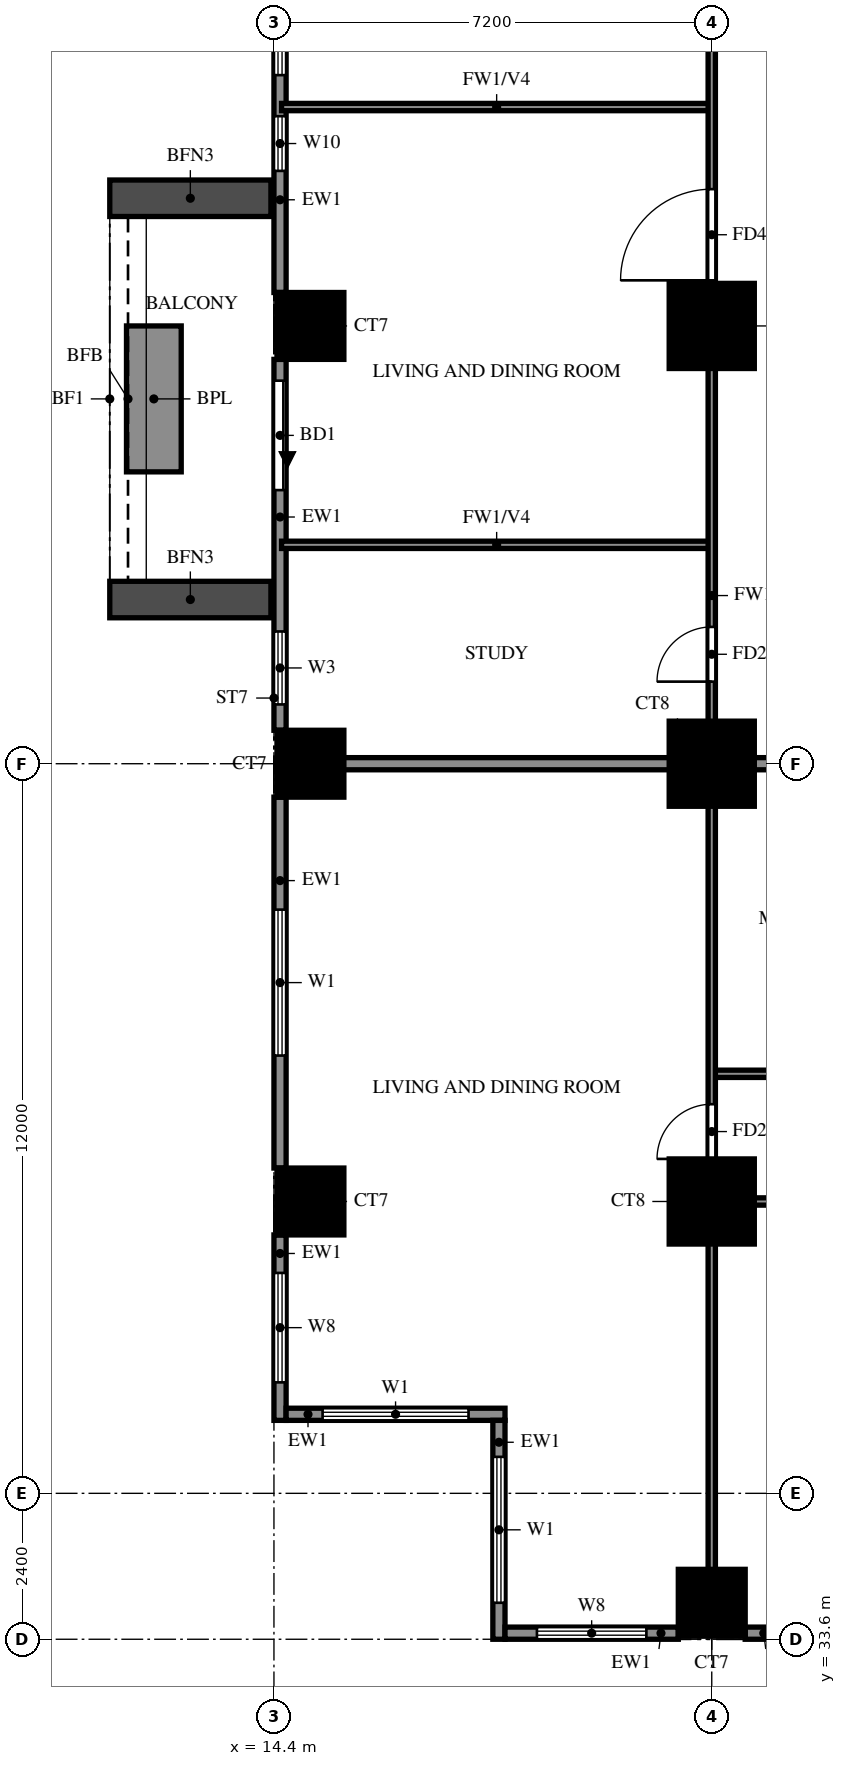
"""IFC4 building model, lengths in metres.
Left out: names, types, materials, properties, quantities, classifications, styles, units other than length and angle.
Written with IfcOpenShell. Run it as: python <this file> out.ifc"""

import sys

from ifc_helpers import new_model, si_unit, direction, frame, frame_2d, origin, origin_2d, place, context, subcontext, project, spatial, rectangle, extrude, source, transform, mapped, element, fill, save


model = new_model("IFC4")
c1 = context("Model", 3, precision=1e-05, world=origin(), true_north=direction((0.0, 1.0)))
c2 = subcontext(c1, "Body", "Model", "MODEL_VIEW")
j1 = project(units=[si_unit("LENGTHUNIT", "METRE"), si_unit("PLANEANGLEUNIT", "RADIAN")], contexts=[c1])
p1 = place(None, origin())
s1 = spatial("IfcSite", under=j1, at=p1, CompositionType="ELEMENT")
p2 = place(p1, origin())
s2 = spatial("IfcBuilding", under=s1, at=p2, CompositionType="ELEMENT")
p3 = place(p2, frame((0.0, 0.0, 34.0)))
s3 = spatial("IfcBuildingStorey", under=s2, at=p3, CompositionType="ELEMENT", Elevation=34.0)
m1 = source(origin(), c2, "Body", "SweptSolid", [
    extrude(rectangle(XDim=1.1, YDim=1.1, at=origin_2d()), origin(), (0.0, 0.0, 1.0), 3.18),
])
for number, where, z_axis, x_axis in (
    (1, (21.6, 34.2, 0.0), (0.0, 0.0, 1.0), (1.0, 0.0, 0.0)),
    (2, (15.0, 40.8, 0.0), (0.0, 0.0, 1.0), (1.0, 0.0, 0.0)),
):
    element("IfcColumn", number, at=place(p3, frame(where, z_axis=z_axis, x_axis=x_axis)), inside=s3, PredefinedType="COLUMN", context=c2, shape_type="MappedRepresentation", body=[
        mapped(m1, transform((0.0, 0.0, 0.0))),
    ])
m2 = source(origin(), c2, "Body", "SweptSolid", [
    extrude(rectangle(XDim=1.4, YDim=1.4, at=origin_2d()), origin(), (0.0, 0.0, 1.0), 3.18),
])
p4 = place(p3, frame((21.6, 40.8, 0.0), z_axis=(0.0, 0.0, 1.0), x_axis=(1.0, 0.0, 0.0)))
e3 = element("IfcColumn", 3, at=p4, inside=s3, PredefinedType="COLUMN", context=c2, shape_type="MappedRepresentation", body=[
    mapped(m2, transform((0.0, 0.0, 0.0))),
])
p5 = place(p3, frame((15.0, 48.0, 0.0), z_axis=(0.0, 0.0, 1.0), x_axis=(1.0, 0.0, 0.0)))
e4 = element("IfcColumn", 4, at=p5, inside=s3, PredefinedType="COLUMN", context=c2, shape_type="MappedRepresentation", body=[
    mapped(m1, transform((0.0, 0.0, 0.0))),
])
p6 = place(p3, frame((21.6, 48.0, 0.0), z_axis=(0.0, 0.0, 1.0), x_axis=(1.0, 0.0, 0.0)))
e5 = element("IfcColumn", 5, at=p6, inside=s3, PredefinedType="COLUMN", context=c2, shape_type="MappedRepresentation", body=[
    mapped(m2, transform((0.0, 0.0, 0.0))),
])
p7 = place(p3, frame((15.0, 55.2, 0.0), z_axis=(0.0, 0.0, 1.0), x_axis=(1.0, 0.0, 0.0)))
e6 = element("IfcColumn", 6, at=p7, inside=s3, PredefinedType="COLUMN", context=c2, shape_type="MappedRepresentation", body=[
    mapped(m1, transform((0.0, 0.0, 0.0))),
])
p8 = place(p3, frame((21.6, 55.2, 0.0), z_axis=(0.0, 0.0, 1.0), x_axis=(1.0, 0.0, 0.0)))
e7 = element("IfcColumn", 7, at=p8, inside=s3, PredefinedType="COLUMN", context=c2, shape_type="MappedRepresentation", body=[
    mapped(m2, transform((0.0, 0.0, 0.0))),
])
p9 = place(p3, frame((14.5, 61.85, 0.0), z_axis=(0.0, 0.0, 1.0), x_axis=(0.0, -1.0, 0.0)))
e8 = element("IfcWall", 8, at=p9, inside=s3, PredefinedType="SOLIDWALL", context=c2, shape_type="SweptSolid", body=[
    extrude(rectangle(XDim=6.1, YDim=0.2, at=frame_2d((3.05, 0.0))), origin(), (0.0, 0.0, 1.0), 3.18),
])
p10 = place(p9, frame((3.2, 0.0, 0.6)))
e9 = element("IfcOpeningElement", 9, at=p10, cuts=e8, PredefinedType="OPENING", context=c2, shape_type="SweptSolid", body=[
    extrude(rectangle(XDim=0.9, YDim=2.4, at=frame_2d((0.45, 1.2))), frame((0.0, 0.11, 0.0), z_axis=(0.0, -1.0, 0.0), x_axis=(1.0, 0.0, 0.0)), (0.0, 0.0, 1.0), 0.22),
])
p11 = place(p9, frame((0.725, 0.0, 0.6)))
e10 = element("IfcOpeningElement", 10, at=p11, cuts=e8, PredefinedType="OPENING", context=c2, shape_type="SweptSolid", body=[
    extrude(rectangle(XDim=1.8, YDim=2.4, at=frame_2d((0.9, 1.2))), frame((0.0, 0.11, 0.0), z_axis=(0.0, -1.0, 0.0), x_axis=(1.0, 0.0, 0.0)), (0.0, 0.0, 1.0), 0.22),
])
p12 = place(p3, frame((14.5, 54.65, 0.0), z_axis=(0.0, 0.0, 1.0), x_axis=(0.0, -1.0, 0.0)))
e11 = element("IfcWall", 11, at=p12, inside=s3, PredefinedType="SOLIDWALL", context=c2, shape_type="SweptSolid", body=[
    extrude(rectangle(XDim=6.1, YDim=0.2, at=frame_2d((3.05, 0.0))), origin(), (0.0, 0.0, 1.0), 3.18),
])
p13 = place(p12, frame((0.35, 0.0, 0.0)))
e12 = element("IfcOpeningElement", 12, at=p13, cuts=e11, PredefinedType="OPENING", context=c2, shape_type="SweptSolid", body=[
    extrude(rectangle(XDim=1.8, YDim=2.4, at=frame_2d((0.9, 1.2))), frame((0.0, 0.11, 0.0), z_axis=(0.0, -1.0, 0.0), x_axis=(1.0, 0.0, 0.0)), (0.0, 0.0, 1.0), 0.22),
])
p14 = place(p12, frame((4.475, 0.0, 0.6)))
e13 = element("IfcOpeningElement", 13, at=p14, cuts=e11, PredefinedType="OPENING", context=c2, shape_type="SweptSolid", body=[
    extrude(rectangle(XDim=1.2, YDim=2.4, at=frame_2d((0.6, 1.2))), frame((0.0, 0.11, 0.0), z_axis=(0.0, -1.0, 0.0), x_axis=(1.0, 0.0, 0.0)), (0.0, 0.0, 1.0), 0.22),
])
p15 = place(p3, frame((14.5, 47.45, 0.0), z_axis=(0.0, 0.0, 1.0), x_axis=(0.0, -1.0, 0.0)))
e14 = element("IfcWall", 14, at=p15, inside=s3, PredefinedType="SOLIDWALL", context=c2, shape_type="SweptSolid", body=[
    extrude(rectangle(XDim=6.1, YDim=0.2, at=frame_2d((3.05, 0.0))), origin(), (0.0, 0.0, 1.0), 3.18),
])
p16 = place(p15, frame((1.85, 0.0, 0.6)))
e15 = element("IfcOpeningElement", 15, at=p16, cuts=e14, PredefinedType="OPENING", context=c2, shape_type="SweptSolid", body=[
    extrude(rectangle(XDim=2.4, YDim=2.4, at=frame_2d((1.2, 1.2))), frame((0.0, 0.11, 0.0), z_axis=(0.0, -1.0, 0.0), x_axis=(1.0, 0.0, 0.0)), (0.0, 0.0, 1.0), 0.22),
])
p17 = place(p3, frame((14.5, 40.25, 0.0), z_axis=(0.0, 0.0, 1.0), x_axis=(0.0, -1.0, 0.0)))
e16 = element("IfcWall", 16, at=p17, inside=s3, PredefinedType="SOLIDWALL", context=c2, shape_type="SweptSolid", body=[
    extrude(rectangle(XDim=3.05, YDim=0.2, at=frame_2d((1.525, 0.0))), origin(), (0.0, 0.0, 1.0), 3.18),
])
p18 = place(p17, frame((0.625, 0.0, 0.6)))
e17 = element("IfcOpeningElement", 17, at=p18, cuts=e16, PredefinedType="OPENING", context=c2, shape_type="SweptSolid", body=[
    extrude(rectangle(XDim=1.8, YDim=2.4, at=frame_2d((0.9, 1.2))), frame((0.0, 0.11, 0.0), z_axis=(0.0, -1.0, 0.0), x_axis=(1.0, 0.0, 0.0)), (0.0, 0.0, 1.0), 0.22),
])
p19 = place(p3, frame((14.6, 37.3, 0.0), z_axis=(0.0, 0.0, 1.0), x_axis=(1.0, 0.0, 0.0)))
e18 = element("IfcWall", 18, at=p19, inside=s3, PredefinedType="SOLIDWALL", context=c2, shape_type="SweptSolid", body=[
    extrude(rectangle(XDim=3.6, YDim=0.2, at=frame_2d((1.8, 0.0))), origin(), (0.0, 0.0, 1.0), 3.18),
])
p20 = place(p19, frame((0.6, 0.0, 0.6)))
e19 = element("IfcOpeningElement", 19, at=p20, cuts=e18, PredefinedType="OPENING", context=c2, shape_type="SweptSolid", body=[
    extrude(rectangle(XDim=2.4, YDim=2.4, at=frame_2d((1.2, 1.2))), frame((0.0, 0.11, 0.0), z_axis=(0.0, -1.0, 0.0), x_axis=(1.0, 0.0, 0.0)), (0.0, 0.0, 1.0), 0.22),
])
p21 = place(p3, frame((18.1, 37.2, 0.0), z_axis=(0.0, 0.0, 1.0), x_axis=(0.0, -1.0, 0.0)))
e20 = element("IfcWall", 20, at=p21, inside=s3, PredefinedType="SOLIDWALL", context=c2, shape_type="SweptSolid", body=[
    extrude(rectangle(XDim=3.6, YDim=0.2, at=frame_2d((1.8, 0.0))), origin(), (0.0, 0.0, 1.0), 3.18),
])
p22 = place(p21, frame((0.6, 0.0, 0.6)))
e21 = element("IfcOpeningElement", 21, at=p22, cuts=e20, PredefinedType="OPENING", context=c2, shape_type="SweptSolid", body=[
    extrude(rectangle(XDim=2.4, YDim=2.4, at=frame_2d((1.2, 1.2))), frame((0.0, 0.11, 0.0), z_axis=(0.0, -1.0, 0.0), x_axis=(1.0, 0.0, 0.0)), (0.0, 0.0, 1.0), 0.22),
])
p23 = place(p3, frame((18.2, 33.7, 0.0), z_axis=(0.0, 0.0, 1.0), x_axis=(1.0, 0.0, 0.0)))
e22 = element("IfcWall", 22, at=p23, inside=s3, PredefinedType="SOLIDWALL", context=c2, shape_type="SweptSolid", body=[
    extrude(rectangle(XDim=2.85, YDim=0.2, at=frame_2d((1.425, 0.0))), origin(), (0.0, 0.0, 1.0), 3.18),
])
p24 = place(p23, frame((0.525, 0.0, 0.6)))
e23 = element("IfcOpeningElement", 23, at=p24, cuts=e22, PredefinedType="OPENING", context=c2, shape_type="SweptSolid", body=[
    extrude(rectangle(XDim=1.8, YDim=2.4, at=frame_2d((0.9, 1.2))), frame((0.0, 0.11, 0.0), z_axis=(0.0, -1.0, 0.0), x_axis=(1.0, 0.0, 0.0)), (0.0, 0.0, 1.0), 0.22),
])
p25 = place(p3, frame((22.15, 33.7, 0.0), z_axis=(0.0, 0.0, 1.0), x_axis=(1.0, 0.0, 0.0)))
e24 = element("IfcWall", 24, at=p25, inside=s3, PredefinedType="SOLIDWALL", context=c2, shape_type="SweptSolid", body=[
    extrude(rectangle(XDim=6.1, YDim=0.2, at=frame_2d((3.05, 0.0))), origin(), (0.0, 0.0, 1.0), 3.18),
])
p26 = place(p25, frame((0.725, 0.0, 0.6)))
e25 = element("IfcOpeningElement", 25, at=p26, cuts=e24, PredefinedType="OPENING", context=c2, shape_type="SweptSolid", body=[
    extrude(rectangle(XDim=1.8, YDim=2.4, at=frame_2d((0.9, 1.2))), frame((0.0, 0.11, 0.0), z_axis=(0.0, -1.0, 0.0), x_axis=(1.0, 0.0, 0.0)), (0.0, 0.0, 1.0), 0.22),
])
p27 = place(p25, frame((3.575, 0.0, 0.6)))
e26 = element("IfcOpeningElement", 26, at=p27, cuts=e24, PredefinedType="OPENING", context=c2, shape_type="SweptSolid", body=[
    extrude(rectangle(XDim=1.8, YDim=2.4, at=frame_2d((0.9, 1.2))), frame((0.0, 0.11, 0.0), z_axis=(0.0, -1.0, 0.0), x_axis=(1.0, 0.0, 0.0)), (0.0, 0.0, 1.0), 0.22),
])
for number, where, z_axis, x_axis in (
    (27, (14.35, 57.3, 0.0), (0.0, 0.0, 1.0), (-1.0, 0.0, 0.0)),
    (28, (14.35, 50.7, 0.0), (0.0, 0.0, 1.0), (-1.0, 0.0, 0.0)),
):
    element("IfcWall", number, at=place(p3, frame(where, z_axis=z_axis, x_axis=x_axis)), inside=s3, PredefinedType="SOLIDWALL", context=c2, shape_type="SweptSolid", body=[
        extrude(rectangle(XDim=2.65, YDim=0.6, at=frame_2d((1.325, 0.0))), origin(), (0.0, 0.0, 1.0), 2.85),
    ])
p28 = place(p3, frame((12.425, 55.2, 0.0), z_axis=(0.0, 0.0, 1.0), x_axis=(0.0, -1.0, 0.0)))
e29 = element("IfcWall", 29, at=p28, inside=s3, PredefinedType="SOLIDWALL", context=c2, shape_type="SweptSolid", body=[
    extrude(rectangle(XDim=2.4, YDim=0.9, at=frame_2d((1.2, 0.0))), origin(), (0.0, 0.0, 1.0), 0.9),
])
p29 = place(p3, frame((14.525, 48.0, 0.0), z_axis=(0.0, 0.0, 1.0), x_axis=(1.0, 0.0, 0.0)))
e30 = element("IfcWall", 30, at=p29, inside=s3, PredefinedType="SOLIDWALL", context=c2, shape_type="SweptSolid", body=[
    extrude(rectangle(XDim=19.075, YDim=0.2, at=frame_2d((9.538, 0.0))), origin(), (0.0, 0.0, 1.0), 3.18),
])
p30 = place(p3, frame((21.6, 40.8, 0.0), z_axis=(0.0, 0.0, 1.0), x_axis=(1.0, 0.0, 0.0)))
e31 = element("IfcWall", 31, at=p30, inside=s3, PredefinedType="PARTITIONING", context=c2, shape_type="SweptSolid", body=[
    extrude(rectangle(XDim=7.2, YDim=0.12, at=frame_2d((3.6, 0.0))), origin(), (0.0, 0.0, 1.0), 3.18),
])
p31 = place(p30, frame((1.35, 0.0, 0.0)))
e32 = element("IfcOpeningElement", 32, at=p31, cuts=e31, PredefinedType="OPENING", context=c2, shape_type="SweptSolid", body=[
    extrude(rectangle(XDim=0.9, YDim=2.1, at=frame_2d((0.45, 1.05))), frame((0.0, 0.07, 0.0), z_axis=(0.0, -1.0, 0.0), x_axis=(1.0, 0.0, 0.0)), (0.0, 0.0, 1.0), 0.14),
])
p32 = place(p30, frame((4.95, 0.0, 0.0)))
e33 = element("IfcOpeningElement", 33, at=p32, cuts=e31, PredefinedType="OPENING", context=c2, shape_type="SweptSolid", body=[
    extrude(rectangle(XDim=0.9, YDim=2.1, at=frame_2d((0.45, 1.05))), frame((0.0, 0.07, 0.0), z_axis=(0.0, -1.0, 0.0), x_axis=(1.0, 0.0, 0.0)), (0.0, 0.0, 1.0), 0.14),
])
p33 = place(p3, frame((21.6, 42.9, 0.0), z_axis=(0.0, 0.0, 1.0), x_axis=(1.0, 0.0, 0.0)))
e34 = element("IfcWall", 34, at=p33, inside=s3, PredefinedType="PARTITIONING", context=c2, shape_type="SweptSolid", body=[
    extrude(rectangle(XDim=15.6, YDim=0.12, at=frame_2d((7.8, 0.0))), origin(), (0.0, 0.0, 1.0), 3.18),
])
p34 = place(p33, frame((1.375, 0.0, 0.0)))
e35 = element("IfcOpeningElement", 35, at=p34, cuts=e34, PredefinedType="OPENING", context=c2, shape_type="SweptSolid", body=[
    extrude(rectangle(XDim=0.9, YDim=2.1, at=frame_2d((0.45, 1.05))), frame((0.0, 0.07, 0.0), z_axis=(0.0, -1.0, 0.0), x_axis=(1.0, 0.0, 0.0)), (0.0, 0.0, 1.0), 0.14),
])
p35 = place(p33, frame((5.5, 0.0, 0.0)))
e36 = element("IfcOpeningElement", 36, at=p35, cuts=e34, PredefinedType="OPENING", context=c2, shape_type="SweptSolid", body=[
    extrude(rectangle(XDim=0.9, YDim=2.1, at=frame_2d((0.45, 1.05))), frame((0.0, 0.07, 0.0), z_axis=(0.0, -1.0, 0.0), x_axis=(1.0, 0.0, 0.0)), (0.0, 0.0, 1.0), 0.14),
])
p36 = place(p33, frame((9.725, 0.0, 0.0)))
e37 = element("IfcOpeningElement", 37, at=p36, cuts=e34, PredefinedType="OPENING", context=c2, shape_type="SweptSolid", body=[
    extrude(rectangle(XDim=0.8, YDim=2.1, at=frame_2d((0.4, 1.05))), frame((0.0, 0.07, 0.0), z_axis=(0.0, -1.0, 0.0), x_axis=(1.0, 0.0, 0.0)), (0.0, 0.0, 1.0), 0.14),
])
p37 = place(p33, frame((13.35, 0.0, 0.0)))
e38 = element("IfcOpeningElement", 38, at=p37, cuts=e34, PredefinedType="OPENING", context=c2, shape_type="SweptSolid", body=[
    extrude(rectangle(XDim=0.9, YDim=2.1, at=frame_2d((0.45, 1.05))), frame((0.0, 0.07, 0.0), z_axis=(0.0, -1.0, 0.0), x_axis=(1.0, 0.0, 0.0)), (0.0, 0.0, 1.0), 0.14),
])
for number, where, z_axis, x_axis in (
    (39, (14.525, 51.6, 0.0), (0.0, 0.0, 1.0), (1.0, 0.0, 0.0)),
    (40, (14.525, 58.8, 0.0), (0.0, 0.0, 1.0), (1.0, 0.0, 0.0)),
):
    element("IfcWall", number, at=place(p3, frame(where, z_axis=z_axis, x_axis=x_axis)), inside=s3, PredefinedType="PARTITIONING", context=c2, shape_type="SweptSolid", body=[
        extrude(rectangle(XDim=7.075, YDim=0.12, at=frame_2d((3.538, 0.0))), origin(), (0.0, 0.0, 1.0), 2.28),
    ])
p38 = place(p3, frame((21.6, 33.725, 0.0), z_axis=(0.0, 0.0, 1.0), x_axis=(0.0, 1.0, 0.0)))
e41 = element("IfcWall", 41, at=p38, inside=s3, PredefinedType="PARTITIONING", context=c2, shape_type="SweptSolid", body=[
    extrude(rectangle(XDim=35.875, YDim=0.12, at=frame_2d((17.938, 0.0))), origin(), (0.0, 0.0, 1.0), 3.18),
])
p39 = place(p38, frame((7.775, 0.0, 0.0)))
e42 = element("IfcOpeningElement", 42, at=p39, cuts=e41, PredefinedType="OPENING", context=c2, shape_type="SweptSolid", body=[
    extrude(rectangle(XDim=0.9, YDim=2.1, at=frame_2d((0.45, 1.05))), frame((0.0, 0.07, 0.0), z_axis=(0.0, -1.0, 0.0), x_axis=(1.0, 0.0, 0.0)), (0.0, 0.0, 1.0), 0.14),
])
p40 = place(p38, frame((15.625, 0.0, 0.0)))
e43 = element("IfcOpeningElement", 43, at=p40, cuts=e41, PredefinedType="OPENING", context=c2, shape_type="SweptSolid", body=[
    extrude(rectangle(XDim=0.9, YDim=2.1, at=frame_2d((0.45, 1.05))), frame((0.0, 0.07, 0.0), z_axis=(0.0, -1.0, 0.0), x_axis=(1.0, 0.0, 0.0)), (0.0, 0.0, 1.0), 0.14),
])
p41 = place(p38, frame((22.225, 0.0, 0.0)))
e44 = element("IfcOpeningElement", 44, at=p41, cuts=e41, PredefinedType="OPENING", context=c2, shape_type="SweptSolid", body=[
    extrude(rectangle(XDim=1.5, YDim=2.1, at=frame_2d((0.75, 1.05))), frame((0.0, 0.07, 0.0), z_axis=(0.0, -1.0, 0.0), x_axis=(1.0, 0.0, 0.0)), (0.0, 0.0, 1.0), 0.14),
])
p42 = place(p38, frame((26.425, 0.0, 0.0)))
e45 = element("IfcOpeningElement", 45, at=p42, cuts=e41, PredefinedType="OPENING", context=c2, shape_type="SweptSolid", body=[
    extrude(rectangle(XDim=0.9, YDim=2.1, at=frame_2d((0.45, 1.05))), frame((0.0, 0.07, 0.0), z_axis=(0.0, -1.0, 0.0), x_axis=(1.0, 0.0, 0.0)), (0.0, 0.0, 1.0), 0.14),
])
p43 = place(p38, frame((30.025, 0.0, 0.0)))
e46 = element("IfcOpeningElement", 46, at=p43, cuts=e41, PredefinedType="OPENING", context=c2, shape_type="SweptSolid", body=[
    extrude(rectangle(XDim=0.9, YDim=2.1, at=frame_2d((0.45, 1.05))), frame((0.0, 0.07, 0.0), z_axis=(0.0, -1.0, 0.0), x_axis=(1.0, 0.0, 0.0)), (0.0, 0.0, 1.0), 0.14),
])
p44 = place(p38, frame((33.625, 0.0, 0.0)))
e47 = element("IfcOpeningElement", 47, at=p44, cuts=e41, PredefinedType="OPENING", context=c2, shape_type="SweptSolid", body=[
    extrude(rectangle(XDim=0.9, YDim=2.1, at=frame_2d((0.45, 1.05))), frame((0.0, 0.07, 0.0), z_axis=(0.0, -1.0, 0.0), x_axis=(1.0, 0.0, 0.0)), (0.0, 0.0, 1.0), 0.14),
])
p45 = place(p10, origin())
e48 = element("IfcWindow", 48, at=p45, inside=s3, PartitioningType="SINGLE_PANEL", PredefinedType="WINDOW", context=c2, shape_type="SweptSolid", body=[
    extrude(rectangle(XDim=0.9, YDim=2.4, at=frame_2d((0.45, 1.2))), frame((0.0, 0.03, 0.0), z_axis=(0.0, -1.0, 0.0), x_axis=(1.0, 0.0, 0.0)), (0.0, 0.0, 1.0), 0.06),
])
fill(e9, e48)
p46 = place(p11, origin())
e49 = element("IfcWindow", 49, at=p46, inside=s3, PartitioningType="DOUBLE_PANEL_VERTICAL", PredefinedType="WINDOW", context=c2, shape_type="SweptSolid", body=[
    extrude(rectangle(XDim=1.8, YDim=2.4, at=frame_2d((0.9, 1.2))), frame((0.0, 0.03, 0.0), z_axis=(0.0, -1.0, 0.0), x_axis=(1.0, 0.0, 0.0)), (0.0, 0.0, 1.0), 0.06),
])
fill(e10, e49)
p47 = place(p13, origin())
e50 = element("IfcDoor", 50, at=p47, inside=s3, OperationType="DOUBLE_DOOR_SLIDING", PredefinedType="DOOR", context=c2, shape_type="SweptSolid", body=[
    extrude(rectangle(XDim=1.8, YDim=2.4, at=frame_2d((0.9, 1.2))), frame((0.0, 0.025, 0.0), z_axis=(0.0, -1.0, 0.0), x_axis=(1.0, 0.0, 0.0)), (0.0, 0.0, 1.0), 0.05),
])
fill(e12, e50)
p48 = place(p14, origin())
e51 = element("IfcWindow", 51, at=p48, inside=s3, PartitioningType="SINGLE_PANEL", PredefinedType="WINDOW", context=c2, shape_type="SweptSolid", body=[
    extrude(rectangle(XDim=1.2, YDim=2.4, at=frame_2d((0.6, 1.2))), frame((0.0, 0.03, 0.0), z_axis=(0.0, -1.0, 0.0), x_axis=(1.0, 0.0, 0.0)), (0.0, 0.0, 1.0), 0.06),
])
fill(e13, e51)
p49 = place(p16, origin())
e52 = element("IfcWindow", 52, at=p49, inside=s3, PartitioningType="DOUBLE_PANEL_VERTICAL", PredefinedType="WINDOW", context=c2, shape_type="SweptSolid", body=[
    extrude(rectangle(XDim=2.4, YDim=2.4, at=frame_2d((1.2, 1.2))), frame((0.0, 0.03, 0.0), z_axis=(0.0, -1.0, 0.0), x_axis=(1.0, 0.0, 0.0)), (0.0, 0.0, 1.0), 0.06),
])
fill(e15, e52)
p50 = place(p18, origin())
e53 = element("IfcWindow", 53, at=p50, inside=s3, PartitioningType="DOUBLE_PANEL_VERTICAL", PredefinedType="WINDOW", context=c2, shape_type="SweptSolid", body=[
    extrude(rectangle(XDim=1.8, YDim=2.4, at=frame_2d((0.9, 1.2))), frame((0.0, 0.03, 0.0), z_axis=(0.0, -1.0, 0.0), x_axis=(1.0, 0.0, 0.0)), (0.0, 0.0, 1.0), 0.06),
])
fill(e17, e53)
p51 = place(p20, origin())
e54 = element("IfcWindow", 54, at=p51, inside=s3, PartitioningType="DOUBLE_PANEL_VERTICAL", PredefinedType="WINDOW", context=c2, shape_type="SweptSolid", body=[
    extrude(rectangle(XDim=2.4, YDim=2.4, at=frame_2d((1.2, 1.2))), frame((0.0, 0.03, 0.0), z_axis=(0.0, -1.0, 0.0), x_axis=(1.0, 0.0, 0.0)), (0.0, 0.0, 1.0), 0.06),
])
fill(e19, e54)
p52 = place(p22, origin())
e55 = element("IfcWindow", 55, at=p52, inside=s3, PartitioningType="DOUBLE_PANEL_VERTICAL", PredefinedType="WINDOW", context=c2, shape_type="SweptSolid", body=[
    extrude(rectangle(XDim=2.4, YDim=2.4, at=frame_2d((1.2, 1.2))), frame((0.0, 0.03, 0.0), z_axis=(0.0, -1.0, 0.0), x_axis=(1.0, 0.0, 0.0)), (0.0, 0.0, 1.0), 0.06),
])
fill(e21, e55)
p53 = place(p24, origin())
e56 = element("IfcWindow", 56, at=p53, inside=s3, PartitioningType="DOUBLE_PANEL_VERTICAL", PredefinedType="WINDOW", context=c2, shape_type="SweptSolid", body=[
    extrude(rectangle(XDim=1.8, YDim=2.4, at=frame_2d((0.9, 1.2))), frame((0.0, 0.03, 0.0), z_axis=(0.0, -1.0, 0.0), x_axis=(1.0, 0.0, 0.0)), (0.0, 0.0, 1.0), 0.06),
])
fill(e23, e56)
p54 = place(p39, origin())
e57 = element("IfcDoor", 57, at=p54, inside=s3, OperationType="SINGLE_SWING_RIGHT", PredefinedType="DOOR", context=c2, shape_type="SweptSolid", body=[
    extrude(rectangle(XDim=0.9, YDim=2.1, at=frame_2d((0.45, 1.05))), frame((0.0, 0.025, 0.0), z_axis=(0.0, -1.0, 0.0), x_axis=(1.0, 0.0, 0.0)), (0.0, 0.0, 1.0), 0.05),
])
fill(e42, e57)
p55 = place(p40, origin())
e58 = element("IfcDoor", 58, at=p55, inside=s3, OperationType="SINGLE_SWING_LEFT", PredefinedType="DOOR", context=c2, shape_type="SweptSolid", body=[
    extrude(rectangle(XDim=0.9, YDim=2.1, at=frame_2d((0.45, 1.05))), frame((0.0, 0.025, 0.0), z_axis=(0.0, -1.0, 0.0), x_axis=(1.0, 0.0, 0.0)), (0.0, 0.0, 1.0), 0.05),
])
fill(e43, e58)
p56 = place(p41, origin())
e59 = element("IfcDoor", 59, at=p56, inside=s3, OperationType="SINGLE_SWING_RIGHT", PredefinedType="DOOR", context=c2, shape_type="SweptSolid", body=[
    extrude(rectangle(XDim=1.5, YDim=2.1, at=frame_2d((0.75, 1.05))), frame((0.0, 0.025, 0.0), z_axis=(0.0, -1.0, 0.0), x_axis=(1.0, 0.0, 0.0)), (0.0, 0.0, 1.0), 0.05),
])
fill(e44, e59)
save(model, sys.argv[1])
